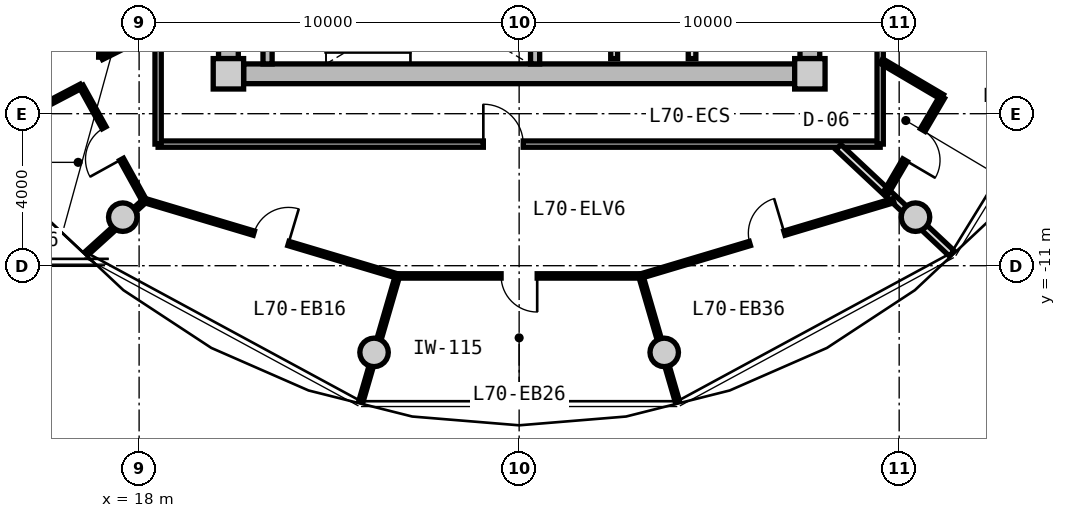
"""IFC4 building model, lengths in metres.
Left out: names, types, materials, properties, quantities, classifications, styles, units other than length and angle.
Written with IfcOpenShell. Run it as: python <this file> out.ifc"""

import sys

from ifc_helpers import new_model, si_unit, direction, frame, frame_2d, origin, origin_2d, place, context, subcontext, project, spatial, rectangle, circle, extrude, source, transform, mapped, element, fill, save


model = new_model("IFC4")
c1 = context("Model", 3, precision=1e-05, world=origin(), true_north=direction((0.0, 1.0)))
c2 = subcontext(c1, "Body", "Model", "MODEL_VIEW")
j1 = project(units=[si_unit("LENGTHUNIT", "METRE"), si_unit("PLANEANGLEUNIT", "RADIAN")], contexts=[c1])
p1 = place(None, origin())
s1 = spatial("IfcSite", under=j1, at=p1, CompositionType="ELEMENT")
p2 = place(p1, origin())
s2 = spatial("IfcBuilding", under=s1, at=p2, CompositionType="ELEMENT")
p3 = place(p2, frame((0.0, 0.0, 226.1)))
s3 = spatial("IfcBuildingStorey", under=s2, at=p3, CompositionType="ELEMENT", Elevation=226.1)
m1 = source(origin(), c2, "Body", "SweptSolid", [
    extrude(rectangle(XDim=0.8, YDim=0.8, at=origin_2d()), origin(), (0.0, 0.0, 1.0), 3.05),
])
for number, where, z_axis, x_axis in (
    (1, (20.35, -5.95, 0.0), (0.0, 0.0, 1.0), (1.0, 0.0, 0.0)),
    (2, (35.65, -5.95, 0.0), (0.0, 0.0, 1.0), (1.0, 0.0, 0.0)),
):
    element("IfcColumn", number, at=place(p3, frame(where, z_axis=z_axis, x_axis=x_axis)), inside=s3, PredefinedType="COLUMN", context=c2, shape_type="MappedRepresentation", body=[
        mapped(m1, transform((0.0, 0.0, 0.0), x_axis=(1.0, 0.0, 0.0), y_axis=(0.0, 1.0, 0.0), z_axis=(0.0, 0.0, 1.0), scale=1.0)),
    ])
m2 = source(origin(), c2, "Body", "SweptSolid", [
    extrude(rectangle(XDim=14.5, YDim=0.52, at=frame_2d((7.25, 0.0))), origin(), (0.0, 0.0, 1.0), 2.76),
])
p4 = place(p3, frame((35.25, -5.95, 0.0), z_axis=(0.0, 0.0, 1.0), x_axis=(-1.0, 0.0, 0.0)))
e3 = element("IfcWall", 3, at=p4, inside=s3, PredefinedType="SHEAR", context=c2, shape_type="MappedRepresentation", body=[
    mapped(m2, transform((0.0, 0.0, 0.0), x_axis=(1.0, 0.0, 0.0), y_axis=(0.0, 1.0, 0.0), z_axis=(0.0, 0.0, 1.0), scale=1.0)),
])
m3 = source(origin(), c2, "Body", "SweptSolid", [
    extrude(rectangle(XDim=11.1, YDim=0.52, at=frame_2d((5.55, 0.0))), origin(), (0.0, 0.0, 1.0), 2.76),
])
p5 = place(p3, frame((20.35, -5.55, 0.0), z_axis=(0.0, 0.0, 1.0), x_axis=(0.0, 1.0, 0.0)))
e4 = element("IfcWall", 4, at=p5, inside=s3, PredefinedType="SHEAR", context=c2, shape_type="MappedRepresentation", body=[
    mapped(m3, transform((0.0, 0.0, 0.0), x_axis=(1.0, 0.0, 0.0), y_axis=(0.0, 1.0, 0.0), z_axis=(0.0, 0.0, 1.0), scale=1.0)),
])
p6 = place(p5, frame((3.8, 0.0, 0.0)))
e5 = element("IfcOpeningElement", 5, at=p6, cuts=e4, PredefinedType="OPENING", context=c2, shape_type="SweptSolid", body=[
    extrude(rectangle(XDim=1.2, YDim=2.15, at=frame_2d((0.6, 1.075))), frame((0.0, 0.27, 0.0), z_axis=(0.0, -1.0, 0.0), x_axis=(1.0, 0.0, 0.0)), (0.0, 0.0, 1.0), 0.54),
])
p7 = place(p3, frame((35.65, 5.55, 0.0), z_axis=(0.0, 0.0, 1.0), x_axis=(0.0, -1.0, 0.0)))
e6 = element("IfcWall", 6, at=p7, inside=s3, PredefinedType="SHEAR", context=c2, shape_type="MappedRepresentation", body=[
    mapped(m3, transform((0.0, 0.0, 0.0), x_axis=(1.0, 0.0, 0.0), y_axis=(0.0, 1.0, 0.0), z_axis=(0.0, 0.0, 1.0), scale=1.0)),
])
p8 = place(p7, frame((5.65, 0.0, 0.0)))
e7 = element("IfcOpeningElement", 7, at=p8, cuts=e6, PredefinedType="OPENING", context=c2, shape_type="SweptSolid", body=[
    extrude(rectangle(XDim=1.2, YDim=2.15, at=frame_2d((0.6, 1.075))), frame((0.0, 0.27, 0.0), z_axis=(0.0, -1.0, 0.0), x_axis=(1.0, 0.0, 0.0)), (0.0, 0.0, 1.0), 0.54),
])
p9 = place(p7, frame((9.3, 0.0, 0.0)))
e8 = element("IfcOpeningElement", 8, at=p9, cuts=e6, PredefinedType="OPENING", context=c2, shape_type="SweptSolid", body=[
    extrude(rectangle(XDim=1.0, YDim=2.1, at=frame_2d((0.5, 1.05))), frame((0.0, 0.27, 0.0), z_axis=(0.0, -1.0, 0.0), x_axis=(1.0, 0.0, 0.0)), (0.0, 0.0, 1.0), 0.54),
])
m4 = source(origin(), c2, "Body", "SweptSolid", [
    extrude(circle(Radius=0.375, at=origin_2d()), origin(), (0.0, 0.0, 1.0), 3.05),
])
for number, where, z_axis, x_axis in (
    (9, (17.57, -9.723, 0.0), (0.0, 0.0, 1.0), (1.0, 0.0, 0.0)),
    (10, (24.182, -13.281, 0.0), (0.0, 0.0, 1.0), (1.0, 0.0, 0.0)),
    (11, (31.818, -13.281, 0.0), (0.0, 0.0, 1.0), (1.0, 0.0, 0.0)),
    (12, (38.43, -9.723, 0.0), (0.0, 0.0, 1.0), (1.0, 0.0, 0.0)),
):
    element("IfcColumn", number, at=place(p3, frame(where, z_axis=z_axis, x_axis=x_axis)), inside=s3, PredefinedType="COLUMN", context=c2, shape_type="MappedRepresentation", body=[
        mapped(m4, transform((0.0, 0.0, 0.0), x_axis=(1.0, 0.0, 0.0), y_axis=(0.0, 1.0, 0.0), z_axis=(0.0, 0.0, 1.0), scale=1.0)),
    ])
m5 = source(origin(), c2, "Body", "SweptSolid", [
    extrude(rectangle(XDim=3.24, YDim=0.24, at=frame_2d((1.62, 0.0))), origin(), (0.0, 0.0, 1.0), 2.76),
])
for number, where, z_axis, x_axis in (
    (13, (21.38, -5.69, 0.0), (0.0, 0.0, 1.0), (0.0, 1.0, 0.0)),
    (14, (28.42, -5.69, 0.0), (0.0, 0.0, 1.0), (0.0, 1.0, 0.0)),
):
    element("IfcWall", number, at=place(p3, frame(where, z_axis=z_axis, x_axis=x_axis)), inside=s3, PredefinedType="PARTITIONING", context=c2, shape_type="MappedRepresentation", body=[
        mapped(m5, transform((0.0, 0.0, 0.0), x_axis=(1.0, 0.0, 0.0), y_axis=(0.0, 1.0, 0.0), z_axis=(0.0, 0.0, 1.0), scale=1.0)),
    ])
m6 = source(origin(), c2, "Body", "SweptSolid", [
    extrude(rectangle(XDim=3.8, YDim=0.2, at=frame_2d((1.9, 0.0))), origin(), (0.0, 0.0, 1.0), 2.745),
])
p10 = place(p3, frame((32.55, -5.55, 0.0), z_axis=(0.0, 0.0, 1.0), x_axis=(0.0, 1.0, 0.0)))
e15 = element("IfcWall", 15, at=p10, inside=s3, PredefinedType="PARTITIONING", context=c2, shape_type="MappedRepresentation", body=[
    mapped(m6, transform((0.0, 0.0, 0.0), x_axis=(1.0, 0.0, 0.0), y_axis=(0.0, 1.0, 0.0), z_axis=(0.0, 0.0, 1.0), scale=1.0)),
])
m7 = source(origin(), c2, "Body", "SweptSolid", [
    extrude(rectangle(XDim=4.2, YDim=0.18, at=frame_2d((2.1, 0.0))), origin(), (0.0, 0.0, 1.0), 2.745),
])
p11 = place(p3, frame((30.5, -5.55, 0.0), z_axis=(0.0, 0.0, 1.0), x_axis=(0.0, 1.0, 0.0)))
e16 = element("IfcWall", 16, at=p11, inside=s3, PredefinedType="PARTITIONING", context=c2, shape_type="MappedRepresentation", body=[
    mapped(m7, transform((0.0, 0.0, 0.0), x_axis=(1.0, 0.0, 0.0), y_axis=(0.0, 1.0, 0.0), z_axis=(0.0, 0.0, 1.0), scale=1.0)),
])
m8 = source(origin(), c2, "Body", "SweptSolid", [
    extrude(rectangle(XDim=19.0, YDim=0.165, at=frame_2d((9.5, 0.0))), origin(), (0.0, 0.0, 1.0), 2.745),
])
p12 = place(p3, frame((37.5, -7.8, 0.0), z_axis=(0.0, 0.0, 1.0), x_axis=(-1.0, 0.0, 0.0)))
e17 = element("IfcWall", 17, at=p12, inside=s3, PredefinedType="PARTITIONING", context=c2, shape_type="MappedRepresentation", body=[
    mapped(m8, transform((0.0, 0.0, 0.0), x_axis=(1.0, 0.0, 0.0), y_axis=(0.0, 1.0, 0.0), z_axis=(0.0, 0.0, 1.0), scale=1.0)),
])
p13 = place(p12, frame((9.392, 0.0, 0.0)))
e18 = element("IfcOpeningElement", 18, at=p13, cuts=e17, PredefinedType="OPENING", context=c2, shape_type="SweptSolid", body=[
    extrude(rectangle(XDim=1.05, YDim=2.15, at=frame_2d((0.525, 1.075))), frame((0.0, 0.093, 0.0), z_axis=(0.0, -1.0, 0.0), x_axis=(1.0, 0.0, 0.0)), (0.0, 0.0, 1.0), 0.185),
])
m9 = source(origin(), c2, "Body", "SweptSolid", [
    extrude(rectangle(XDim=6.88, YDim=0.165, at=frame_2d((3.44, 0.0))), origin(), (0.0, 0.0, 1.0), 2.745),
])
p14 = place(p3, frame((18.5, -7.8, 0.0), z_axis=(0.0, 0.0, 1.0), x_axis=(0.0, 1.0, 0.0)))
e19 = element("IfcWall", 19, at=p14, inside=s3, PredefinedType="PARTITIONING", context=c2, shape_type="MappedRepresentation", body=[
    mapped(m9, transform((0.0, 0.0, 0.0), x_axis=(1.0, 0.0, 0.0), y_axis=(0.0, 1.0, 0.0), z_axis=(0.0, 0.0, 1.0), scale=1.0)),
])
p15 = place(p3, frame((37.5, -0.92, 0.0), z_axis=(0.0, 0.0, 1.0), x_axis=(0.0, -1.0, 0.0)))
e20 = element("IfcWall", 20, at=p15, inside=s3, PredefinedType="PARTITIONING", context=c2, shape_type="MappedRepresentation", body=[
    mapped(m9, transform((0.0, 0.0, 0.0), x_axis=(1.0, 0.0, 0.0), y_axis=(0.0, 1.0, 0.0), z_axis=(0.0, 0.0, 1.0), scale=1.0)),
])
p16 = place(p15, frame((2.586, 0.0, 0.0)))
e21 = element("IfcOpeningElement", 21, at=p16, cuts=e20, PredefinedType="OPENING", context=c2, shape_type="SweptSolid", body=[
    extrude(rectangle(XDim=1.05, YDim=2.15, at=frame_2d((0.525, 1.075))), frame((0.0, 0.093, 0.0), z_axis=(0.0, -1.0, 0.0), x_axis=(1.0, 0.0, 0.0)), (0.0, 0.0, 1.0), 0.185),
])
m10 = source(origin(), c2, "Body", "SweptSolid", [
    extrude(rectangle(XDim=4.089, YDim=0.19, at=frame_2d((2.044, 0.0))), origin(), (0.0, 0.0, 1.0), 2.345),
])
p17 = place(p3, frame((36.402, -7.88, 0.0), z_axis=(0.0, 0.0, 1.0), x_axis=(0.729401273609, -0.684086092577, 0.0)))
e22 = element("IfcWall", 22, at=p17, inside=s3, PredefinedType="PARTITIONING", context=c2, shape_type="MappedRepresentation", body=[
    mapped(m10, transform((0.0, 0.0, 0.0), x_axis=(1.0, 0.0, 0.0), y_axis=(0.0, 1.0, 0.0), z_axis=(0.0, 0.0, 1.0), scale=1.0)),
])
m11 = source(origin(), c2, "Body", "SweptSolid", [
    extrude(rectangle(XDim=6.936, YDim=0.115, at=frame_2d((3.468, 0.0))), origin(), (0.0, 0.0, 1.0), 2.745),
])
p18 = place(p3, frame((18.151, -9.287, 0.0), z_axis=(0.0, 0.0, 1.0), x_axis=(0.958186895835, -0.286143098205, 0.0)))
e23 = element("IfcWall", 23, at=p18, inside=s3, PredefinedType="PARTITIONING", context=c2, shape_type="MappedRepresentation", body=[
    mapped(m11, transform((0.0, 0.0, 0.0), x_axis=(1.0, 0.0, 0.0), y_axis=(0.0, 1.0, 0.0), z_axis=(0.0, 0.0, 1.0), scale=1.0)),
])
p19 = place(p18, frame((2.993, 0.0, 0.0)))
e24 = element("IfcOpeningElement", 24, at=p19, cuts=e23, PredefinedType="OPENING", context=c2, shape_type="SweptSolid", body=[
    extrude(rectangle(XDim=0.95, YDim=2.1, at=frame_2d((0.475, 1.05))), frame((0.0, 0.067, 0.0), z_axis=(0.0, -1.0, 0.0), x_axis=(1.0, 0.0, 0.0)), (0.0, 0.0, 1.0), 0.135),
])
m12 = source(origin(), c2, "Body", "SweptSolid", [
    extrude(rectangle(XDim=2.072, YDim=0.115, at=frame_2d((1.036, 0.0))), origin(), (0.0, 0.0, 1.0), 2.345),
])
p20 = place(p3, frame((18.151, -9.287, 0.0), z_axis=(0.0, 0.0, 1.0), x_axis=(-0.741410125356, -0.671052178314, 0.0)))
e25 = element("IfcWall", 25, at=p20, inside=s3, PredefinedType="PARTITIONING", context=c2, shape_type="MappedRepresentation", body=[
    mapped(m12, transform((0.0, 0.0, 0.0), x_axis=(1.0, 0.0, 0.0), y_axis=(0.0, 1.0, 0.0), z_axis=(0.0, 0.0, 1.0), scale=1.0)),
])
m13 = source(origin(), c2, "Body", "SweptSolid", [
    extrude(rectangle(XDim=6.404, YDim=0.115, at=frame_2d((3.202, 0.0))), origin(), (0.0, 0.0, 1.0), 2.745),
])
p21 = place(p3, frame((24.798, -11.269, 0.0), z_axis=(0.0, 0.0, 1.0), x_axis=(1.0, 0.0, 0.0)))
e26 = element("IfcWall", 26, at=p21, inside=s3, PredefinedType="PARTITIONING", context=c2, shape_type="MappedRepresentation", body=[
    mapped(m13, transform((0.0, 0.0, 0.0), x_axis=(1.0, 0.0, 0.0), y_axis=(0.0, 1.0, 0.0), z_axis=(0.0, 0.0, 1.0), scale=1.0)),
])
p22 = place(p21, frame((2.727, 0.0, 0.0)))
e27 = element("IfcOpeningElement", 27, at=p22, cuts=e26, PredefinedType="OPENING", context=c2, shape_type="SweptSolid", body=[
    extrude(rectangle(XDim=0.95, YDim=2.1, at=frame_2d((0.475, 1.05))), frame((0.0, 0.067, 0.0), z_axis=(0.0, -1.0, 0.0), x_axis=(1.0, 0.0, 0.0)), (0.0, 0.0, 1.0), 0.135),
])
m14 = source(origin(), c2, "Body", "SweptSolid", [
    extrude(rectangle(XDim=3.454, YDim=0.115, at=frame_2d((1.727, 0.0))), origin(), (0.0, 0.0, 1.0), 2.345),
])
p23 = place(p3, frame((24.798, -11.269, 0.0), z_axis=(0.0, 0.0, 1.0), x_axis=(-0.279348499358, -0.960189781193, 0.0)))
e28 = element("IfcWall", 28, at=p23, inside=s3, PredefinedType="PARTITIONING", context=c2, shape_type="MappedRepresentation", body=[
    mapped(m14, transform((0.0, 0.0, 0.0), x_axis=(1.0, 0.0, 0.0), y_axis=(0.0, 1.0, 0.0), z_axis=(0.0, 0.0, 1.0), scale=1.0)),
])
p24 = place(p3, frame((31.203, -11.272, 0.0), z_axis=(0.0, 0.0, 1.0), x_axis=(0.958186895835, 0.286143098205, 0.0)))
e29 = element("IfcWall", 29, at=p24, inside=s3, PredefinedType="PARTITIONING", context=c2, shape_type="MappedRepresentation", body=[
    mapped(m11, transform((0.0, 0.0, 0.0), x_axis=(1.0, 0.0, 0.0), y_axis=(0.0, 1.0, 0.0), z_axis=(0.0, 0.0, 1.0), scale=1.0)),
])
p25 = place(p24, frame((2.993, 0.0, 0.0)))
e30 = element("IfcOpeningElement", 30, at=p25, cuts=e29, PredefinedType="OPENING", context=c2, shape_type="SweptSolid", body=[
    extrude(rectangle(XDim=0.95, YDim=2.1, at=frame_2d((0.475, 1.05))), frame((0.0, 0.067, 0.0), z_axis=(0.0, -1.0, 0.0), x_axis=(1.0, 0.0, 0.0)), (0.0, 0.0, 1.0), 0.135),
])
m15 = source(origin(), c2, "Body", "SweptSolid", [
    extrude(rectangle(XDim=3.451, YDim=0.115, at=frame_2d((1.726, 0.0))), origin(), (0.0, 0.0, 1.0), 2.345),
])
p26 = place(p3, frame((31.203, -11.272, 0.0), z_axis=(0.0, 0.0, 1.0), x_axis=(0.279361559083, -0.960185981624, 0.0)))
e31 = element("IfcWall", 31, at=p26, inside=s3, PredefinedType="PARTITIONING", context=c2, shape_type="MappedRepresentation", body=[
    mapped(m15, transform((0.0, 0.0, 0.0), x_axis=(1.0, 0.0, 0.0), y_axis=(0.0, 1.0, 0.0), z_axis=(0.0, 0.0, 1.0), scale=1.0)),
])
m16 = source(origin(), c2, "Body", "SweptSolid", [
    extrude(rectangle(XDim=1.638, YDim=0.14, at=frame_2d((0.819, 0.0))), origin(), (0.0, 0.0, 1.0), 2.745),
])
p27 = place(p3, frame((18.47, -4.778, 0.0), z_axis=(0.0, 0.0, 1.0), x_axis=(-0.893919977945, -0.448226586707, 0.0)))
e32 = element("IfcWall", 32, at=p27, inside=s3, PredefinedType="PARTITIONING", context=c2, shape_type="MappedRepresentation", body=[
    mapped(m16, transform((0.0, 0.0, 0.0), x_axis=(1.0, 0.0, 0.0), y_axis=(0.0, 1.0, 0.0), z_axis=(0.0, 0.0, 1.0), scale=1.0)),
])
m17 = source(origin(), c2, "Body", "SweptSolid", [
    extrude(rectangle(XDim=2.759, YDim=0.14, at=frame_2d((1.379, 0.0))), origin(), (0.0, 0.0, 1.0), 2.745),
])
p28 = place(p3, frame((17.005, -5.513, 0.0), z_axis=(0.0, 0.0, 1.0), x_axis=(0.01194710728, 0.999928630767, 0.0)))
e33 = element("IfcWall", 33, at=p28, inside=s3, PredefinedType="PARTITIONING", context=c2, shape_type="MappedRepresentation", body=[
    mapped(m17, transform((0.0, 0.0, 0.0), x_axis=(1.0, 0.0, 0.0), y_axis=(0.0, 1.0, 0.0), z_axis=(0.0, 0.0, 1.0), scale=1.0)),
])
p29 = place(p28, frame((0.919, 0.0, 0.0)))
e34 = element("IfcOpeningElement", 34, at=p29, cuts=e33, PredefinedType="OPENING", context=c2, shape_type="SweptSolid", body=[
    extrude(rectangle(XDim=0.92, YDim=2.1, at=frame_2d((0.46, 1.05))), frame((0.0, 0.08, 0.0), z_axis=(0.0, -1.0, 0.0), x_axis=(1.0, 0.0, 0.0)), (0.0, 0.0, 1.0), 0.16),
])
m18 = source(origin(), c2, "Body", "SweptSolid", [
    extrude(rectangle(XDim=2.193, YDim=0.115, at=frame_2d((1.097, 0.0))), origin(), (0.0, 0.0, 1.0), 2.745),
])
p30 = place(p3, frame((16.475, -6.275, 0.0), z_axis=(0.0, 0.0, 1.0), x_axis=(-0.885783595046, -0.464098505435, 0.0)))
e35 = element("IfcWall", 35, at=p30, inside=s3, PredefinedType="PARTITIONING", context=c2, shape_type="MappedRepresentation", body=[
    mapped(m18, transform((0.0, 0.0, 0.0), x_axis=(1.0, 0.0, 0.0), y_axis=(0.0, 1.0, 0.0), z_axis=(0.0, 0.0, 1.0), scale=1.0)),
])
m19 = source(origin(), c2, "Body", "SweptSolid", [
    extrude(rectangle(XDim=3.45, YDim=0.115, at=frame_2d((1.725, 0.0))), origin(), (0.0, 0.0, 1.0), 2.745),
])
p31 = place(p3, frame((16.475, -6.275, 0.0), z_axis=(0.0, 0.0, 1.0), x_axis=(0.483659007882, -0.875256513312, 0.0)))
e36 = element("IfcWall", 36, at=p31, inside=s3, PredefinedType="PARTITIONING", context=c2, shape_type="MappedRepresentation", body=[
    mapped(m19, transform((0.0, 0.0, 0.0), x_axis=(1.0, 0.0, 0.0), y_axis=(0.0, 1.0, 0.0), z_axis=(0.0, 0.0, 1.0), scale=1.0)),
])
p32 = place(p31, frame((1.25, 0.0, 0.0)))
e37 = element("IfcOpeningElement", 37, at=p32, cuts=e36, PredefinedType="OPENING", context=c2, shape_type="SweptSolid", body=[
    extrude(rectangle(XDim=0.95, YDim=2.1, at=frame_2d((0.475, 1.05))), frame((0.0, 0.067, 0.0), z_axis=(0.0, -1.0, 0.0), x_axis=(1.0, 0.0, 0.0)), (0.0, 0.0, 1.0), 0.135),
])
m20 = source(origin(), c2, "Body", "SweptSolid", [
    extrude(rectangle(XDim=1.859, YDim=0.14, at=frame_2d((0.93, 0.0))), origin(), (0.0, 0.0, 1.0), 2.745),
])
p33 = place(p3, frame((37.53, -5.615, 0.0), z_axis=(0.0, 0.0, 1.0), x_axis=(0.861555897139, -0.507662718845, 0.0)))
e38 = element("IfcWall", 38, at=p33, inside=s3, PredefinedType="PARTITIONING", context=c2, shape_type="MappedRepresentation", body=[
    mapped(m20, transform((0.0, 0.0, 0.0), x_axis=(1.0, 0.0, 0.0), y_axis=(0.0, 1.0, 0.0), z_axis=(0.0, 0.0, 1.0), scale=1.0)),
])
m21 = source(origin(), c2, "Body", "SweptSolid", [
    extrude(rectangle(XDim=2.939, YDim=0.14, at=frame_2d((1.47, 0.0))), origin(), (0.0, 0.0, 1.0), 2.745),
])
p34 = place(p3, frame((39.132, -6.559, 0.0), z_axis=(0.0, 0.0, 1.0), x_axis=(-0.505883614636, -0.862601743821, 0.0)))
e39 = element("IfcWall", 39, at=p34, inside=s3, PredefinedType="PARTITIONING", context=c2, shape_type="MappedRepresentation", body=[
    mapped(m21, transform((0.0, 0.0, 0.0), x_axis=(1.0, 0.0, 0.0), y_axis=(0.0, 1.0, 0.0), z_axis=(0.0, 0.0, 1.0), scale=1.0)),
])
p35 = place(p34, frame((1.01, 0.0, 0.0)))
e40 = element("IfcOpeningElement", 40, at=p35, cuts=e39, PredefinedType="OPENING", context=c2, shape_type="SweptSolid", body=[
    extrude(rectangle(XDim=0.92, YDim=2.1, at=frame_2d((0.46, 1.05))), frame((0.0, 0.08, 0.0), z_axis=(0.0, -1.0, 0.0), x_axis=(1.0, 0.0, 0.0)), (0.0, 0.0, 1.0), 0.16),
])
m22 = source(origin(), c2, "Body", "SweptSolid", [
    extrude(rectangle(XDim=1.05, YDim=2.15, at=frame_2d((0.525, 1.075))), frame((0.0, 0.025, 0.0), z_axis=(0.0, -1.0, 0.0), x_axis=(1.0, 0.0, 0.0)), (0.0, 0.0, 1.0), 0.05),
])
p36 = place(p13, frame((1.05, 0.0, 0.0), z_axis=(0.0, 0.0, 1.0), x_axis=(-1.0, 0.0, 0.0)))
e41 = element("IfcDoor", 41, at=p36, inside=s3, OperationType="SINGLE_SWING_LEFT", PredefinedType="DOOR", context=c2, shape_type="MappedRepresentation", body=[
    mapped(m22, transform((0.0, 0.0, 0.0), x_axis=(1.0, 0.0, 0.0), y_axis=(0.0, 1.0, 0.0), z_axis=(0.0, 0.0, 1.0), scale=1.0)),
])
fill(e18, e41)
m23 = source(origin(), c2, "Body", "SweptSolid", [
    extrude(rectangle(XDim=0.95, YDim=2.1, at=frame_2d((0.475, 1.05))), frame((0.0, 0.025, 0.0), z_axis=(0.0, -1.0, 0.0), x_axis=(1.0, 0.0, 0.0)), (0.0, 0.0, 1.0), 0.05),
])
p37 = place(p32, frame((0.95, 0.0, 0.0), z_axis=(0.0, 0.0, 1.0), x_axis=(-1.0, 0.0, 0.0)))
e42 = element("IfcDoor", 42, at=p37, inside=s3, OperationType="SINGLE_SWING_LEFT", PredefinedType="DOOR", context=c2, shape_type="MappedRepresentation", body=[
    mapped(m23, transform((0.0, 0.0, 0.0), x_axis=(1.0, 0.0, 0.0), y_axis=(0.0, 1.0, 0.0), z_axis=(0.0, 0.0, 1.0), scale=1.0)),
])
fill(e37, e42)
p38 = place(p19, origin())
e43 = element("IfcDoor", 43, at=p38, inside=s3, OperationType="SINGLE_SWING_RIGHT", PredefinedType="DOOR", context=c2, shape_type="MappedRepresentation", body=[
    mapped(m23, transform((0.0, 0.0, 0.0), x_axis=(1.0, 0.0, 0.0), y_axis=(0.0, 1.0, 0.0), z_axis=(0.0, 0.0, 1.0), scale=1.0)),
])
fill(e24, e43)
p39 = place(p22, frame((0.95, 0.0, 0.0), z_axis=(0.0, 0.0, 1.0), x_axis=(-1.0, 0.0, 0.0)))
e44 = element("IfcDoor", 44, at=p39, inside=s3, OperationType="SINGLE_SWING_LEFT", PredefinedType="DOOR", context=c2, shape_type="MappedRepresentation", body=[
    mapped(m23, transform((0.0, 0.0, 0.0), x_axis=(1.0, 0.0, 0.0), y_axis=(0.0, 1.0, 0.0), z_axis=(0.0, 0.0, 1.0), scale=1.0)),
])
fill(e27, e44)
p40 = place(p25, origin())
e45 = element("IfcDoor", 45, at=p40, inside=s3, OperationType="SINGLE_SWING_RIGHT", PredefinedType="DOOR", context=c2, shape_type="MappedRepresentation", body=[
    mapped(m23, transform((0.0, 0.0, 0.0), x_axis=(1.0, 0.0, 0.0), y_axis=(0.0, 1.0, 0.0), z_axis=(0.0, 0.0, 1.0), scale=1.0)),
])
fill(e30, e45)
m24 = source(origin(), c2, "Body", "SweptSolid", [
    extrude(rectangle(XDim=0.92, YDim=2.1, at=frame_2d((0.46, 1.05))), frame((0.0, 0.025, 0.0), z_axis=(0.0, -1.0, 0.0), x_axis=(1.0, 0.0, 0.0)), (0.0, 0.0, 1.0), 0.05),
])
p41 = place(p35, origin())
e46 = element("IfcDoor", 46, at=p41, inside=s3, OperationType="SINGLE_SWING_RIGHT", PredefinedType="DOOR", context=c2, shape_type="MappedRepresentation", body=[
    mapped(m24, transform((0.0, 0.0, 0.0), x_axis=(1.0, 0.0, 0.0), y_axis=(0.0, 1.0, 0.0), z_axis=(0.0, 0.0, 1.0), scale=1.0)),
])
fill(e40, e46)
save(model, sys.argv[1])
